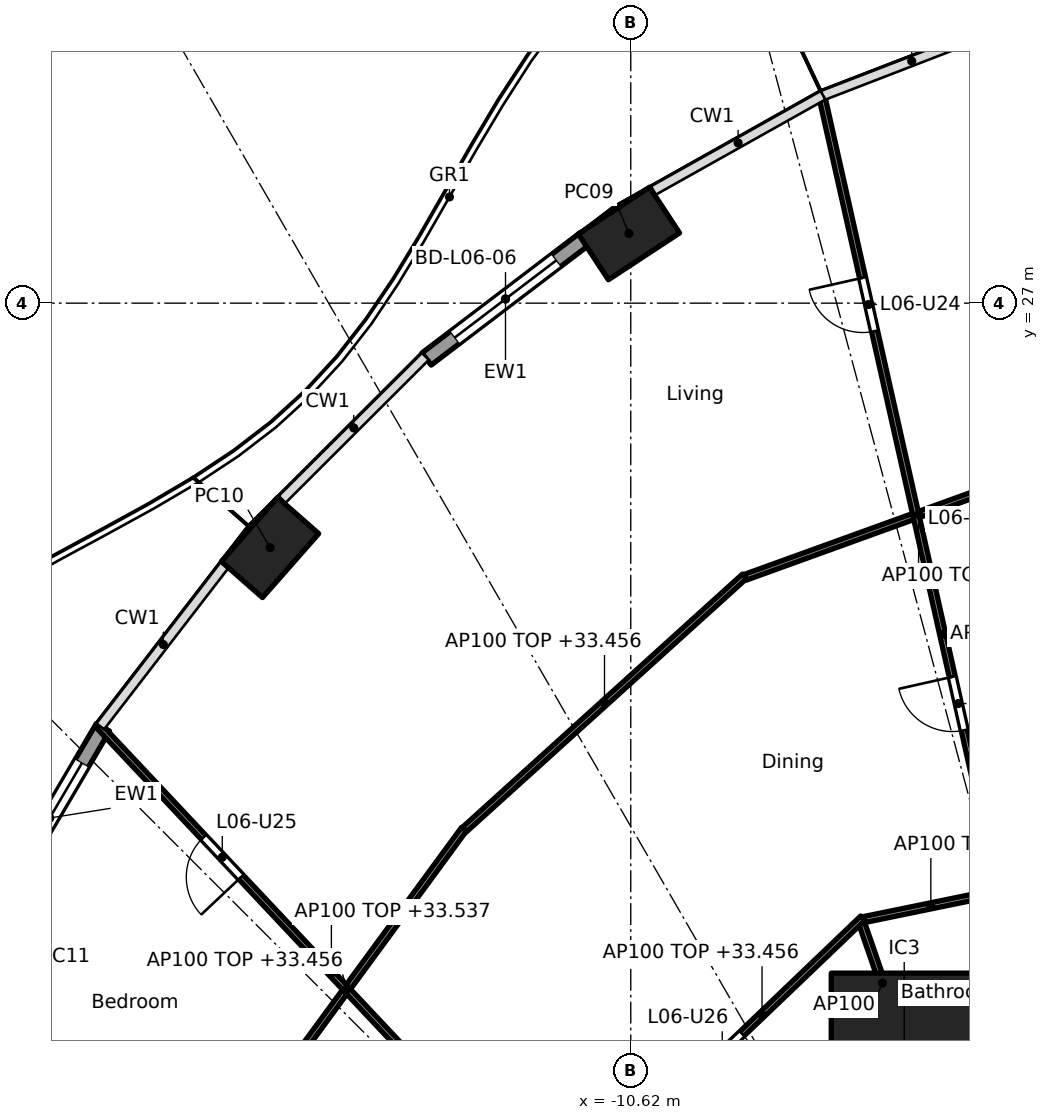
"""IFC4 building model, lengths in metres.
Left out: names, types, materials, properties, quantities, classifications, styles, units other than length and angle.
Written with IfcOpenShell. Run it as: python <this file> out.ifc"""

import sys

from ifc_helpers import new_model, si_unit, direction, frame, frame_2d, origin, origin_2d, place, context, subcontext, project, spatial, rectangle, hollow_rectangle, extrude, element, fill, save


model = new_model("IFC4")
c1 = context("Model", 3, precision=1e-05, world=origin(), true_north=direction((0.0, 1.0)))
c2 = subcontext(c1, "Body", "Model", "MODEL_VIEW")
j1 = project(units=[si_unit("LENGTHUNIT", "METRE"), si_unit("PLANEANGLEUNIT", "RADIAN")], contexts=[c1])
p1 = place(None, origin())
s1 = spatial("IfcSite", under=j1, at=p1, CompositionType="ELEMENT")
p2 = place(p1, origin())
s2 = spatial("IfcBuilding", under=s1, at=p2, CompositionType="ELEMENT")
p3 = place(p2, frame((0.0, 0.0, 30.7)))
s3 = spatial("IfcBuildingStorey", under=s2, at=p3, CompositionType="ELEMENT", Elevation=30.7)
for number, where, z_axis, x_axis in (
    (1, (-10.65, 28.146, 0.0), (0.0, 0.0, 1.0), (-0.836, -0.549, 0.0)),
    (2, (-16.552, 22.981, 0.0), (0.0, 0.0, 1.0), (-0.66, -0.751, 0.0)),
):
    element("IfcColumn", number, at=place(p3, frame(where, z_axis=z_axis, x_axis=x_axis)), inside=s3, PredefinedType="COLUMN", context=c2, shape_type="SweptSolid", body=[
        extrude(hollow_rectangle(XDim=1.4, YDim=0.9, WallThickness=0.05, at=origin_2d()), origin(), (0.0, 0.0, 1.0), 3.7),
    ])
p4 = place(p3, frame((-6.123, 14.782, 0.0), z_axis=(0.0, 0.0, 1.0), x_axis=(1.0, 0.0, 0.0)))
e3 = element("IfcColumn", 3, at=p4, inside=s3, PredefinedType="COLUMN", context=c2, shape_type="SweptSolid", body=[
    extrude(rectangle(XDim=2.4, YDim=2.4, at=origin_2d()), origin(), (0.0, 0.0, 1.0), 3.7),
])
p5 = place(p3, frame((-13.979, 26.081, 0.0), z_axis=(0.0, 0.0, 1.0), x_axis=(0.796022293214, 0.605267303517, 0.0)))
e4 = element("IfcWall", 4, at=p5, inside=s3, PredefinedType="SOLIDWALL", context=c2, shape_type="SweptSolid", body=[
    extrude(rectangle(XDim=3.262, YDim=0.25, at=frame_2d((1.631, 0.0))), origin(), (0.0, 0.0, 1.0), 3.44),
])
p6 = place(p5, frame((0.581, 0.0, 0.0)))
e5 = element("IfcOpeningElement", 5, at=p6, cuts=e4, PredefinedType="OPENING", context=c2, shape_type="SweptSolid", body=[
    extrude(rectangle(XDim=2.1, YDim=2.4, at=frame_2d((1.05, 1.2))), frame((0.0, 0.135, 0.0), z_axis=(0.0, -1.0, 0.0), x_axis=(1.0, 0.0, 0.0)), (0.0, 0.0, 1.0), 0.27),
])
p7 = place(p3, frame((-21.052, 17.04, 0.0), z_axis=(0.0, 0.0, 1.0), x_axis=(0.506311160839, 0.862350861546, 0.0)))
e6 = element("IfcWall", 6, at=p7, inside=s3, PredefinedType="SOLIDWALL", context=c2, shape_type="SweptSolid", body=[
    extrude(rectangle(XDim=3.462, YDim=0.25, at=frame_2d((1.731, 0.0))), origin(), (0.0, 0.0, 1.0), 3.44),
])
p8 = place(p7, frame((0.681, 0.0, 0.0)))
e7 = element("IfcOpeningElement", 7, at=p8, cuts=e6, PredefinedType="OPENING", context=c2, shape_type="SweptSolid", body=[
    extrude(rectangle(XDim=2.1, YDim=2.4, at=frame_2d((1.05, 1.2))), frame((0.0, 0.135, 0.0), z_axis=(0.0, -1.0, 0.0), x_axis=(1.0, 0.0, 0.0)), (0.0, 0.0, 1.0), 0.27),
])
p9 = place(p3, frame((-3.034, 24.554, 0.0), z_axis=(0.0, 0.0, 1.0), x_axis=(-0.940401691072, -0.340065669288, 0.0)))
e8 = element("IfcWall", 8, at=p9, inside=s3, PredefinedType="PARTITIONING", context=c2, shape_type="SweptSolid", body=[
    extrude(rectangle(XDim=6.067, YDim=0.1, at=frame_2d((3.034, 0.0))), origin(), (0.0, 0.0, 1.0), 2.756),
])
p10 = place(p9, frame((1.117, 0.0, 0.0)))
e9 = element("IfcOpeningElement", 9, at=p10, cuts=e8, PredefinedType="OPENING", context=c2, shape_type="SweptSolid", body=[
    extrude(rectangle(XDim=0.9, YDim=2.1, at=frame_2d((0.45, 1.05))), frame((0.0, 0.06, 0.0), z_axis=(0.0, -1.0, 0.0), x_axis=(1.0, 0.0, 0.0)), (0.0, 0.0, 1.0), 0.12),
])
p11 = place(p3, frame((-3.492, 12.662, 0.0), z_axis=(0.0, 0.0, 1.0), x_axis=(-0.219268088006, 0.975664648115, 0.0)))
e10 = element("IfcWall", 10, at=p11, inside=s3, PredefinedType="PARTITIONING", context=c2, shape_type="SweptSolid", body=[
    extrude(rectangle(XDim=18.23, YDim=0.1, at=frame_2d((9.115, 0.0))), origin(), (0.0, 0.0, 1.0), 2.687),
])
p12 = place(p11, frame((0.35, 0.0, 0.0)))
e11 = element("IfcOpeningElement", 11, at=p12, cuts=e10, PredefinedType="OPENING", context=c2, shape_type="SweptSolid", body=[
    extrude(rectangle(XDim=0.9, YDim=2.1, at=frame_2d((0.45, 1.05))), frame((0.0, 0.06, 0.0), z_axis=(0.0, -1.0, 0.0), x_axis=(1.0, 0.0, 0.0)), (0.0, 0.0, 1.0), 0.12),
])
p13 = place(p11, frame((7.497, 0.0, 0.0)))
e12 = element("IfcOpeningElement", 12, at=p13, cuts=e10, PredefinedType="OPENING", context=c2, shape_type="SweptSolid", body=[
    extrude(rectangle(XDim=0.9, YDim=2.1, at=frame_2d((0.45, 1.05))), frame((0.0, 0.06, 0.0), z_axis=(0.0, -1.0, 0.0), x_axis=(1.0, 0.0, 0.0)), (0.0, 0.0, 1.0), 0.12),
])
p14 = place(p11, frame((14.223, 0.0, 0.0)))
e13 = element("IfcOpeningElement", 13, at=p14, cuts=e10, PredefinedType="OPENING", context=c2, shape_type="SweptSolid", body=[
    extrude(rectangle(XDim=0.9, YDim=2.1, at=frame_2d((0.45, 1.05))), frame((0.0, 0.06, 0.0), z_axis=(0.0, -1.0, 0.0), x_axis=(1.0, 0.0, 0.0)), (0.0, 0.0, 1.0), 0.12),
])
p15 = place(p3, frame((-4.58, 17.315, 0.0), z_axis=(0.0, 0.0, 1.0), x_axis=(-0.979581941859, -0.201045316246, 0.0)))
e14 = element("IfcWall", 14, at=p15, inside=s3, PredefinedType="PARTITIONING", context=c2, shape_type="SweptSolid", body=[
    extrude(rectangle(XDim=2.256, YDim=0.1, at=frame_2d((1.128, 0.0))), origin(), (0.0, 0.0, 1.0), 2.756),
])
p16 = place(p3, frame((-6.139, 14.83, 0.0), z_axis=(0.0, 0.0, 1.0), x_axis=(-0.327246993321, 0.944938836837, 0.0)))
e15 = element("IfcWall", 15, at=p16, inside=s3, PredefinedType="PARTITIONING", context=c2, shape_type="SweptSolid", body=[
    extrude(rectangle(XDim=2.09, YDim=0.1, at=frame_2d((1.045, 0.0))), origin(), (0.0, 0.0, 1.0), 3.44),
])
p17 = place(p3, frame((-6.803, 16.886, 0.0), z_axis=(0.0, 0.0, 1.0), x_axis=(-0.722763212502, -0.69109575216, 0.0)))
e16 = element("IfcWall", 16, at=p17, inside=s3, PredefinedType="PARTITIONING", context=c2, shape_type="SweptSolid", body=[
    extrude(rectangle(XDim=4.587, YDim=0.1, at=frame_2d((2.293, 0.0))), origin(), (0.0, 0.0, 1.0), 2.756),
])
p18 = place(p17, frame((2.75, 0.0, 0.0)))
e17 = element("IfcOpeningElement", 17, at=p18, cuts=e16, PredefinedType="OPENING", context=c2, shape_type="SweptSolid", body=[
    extrude(rectangle(XDim=0.9, YDim=2.1, at=frame_2d((0.45, 1.05))), frame((0.0, 0.06, 0.0), z_axis=(0.0, -1.0, 0.0), x_axis=(1.0, 0.0, 0.0)), (0.0, 0.0, 1.0), 0.12),
])
p19 = place(p3, frame((-8.749, 22.508, 0.0), z_axis=(0.0, 0.0, 1.0), x_axis=(-0.741720189244, -0.670709445936, 0.0)))
e18 = element("IfcWall", 18, at=p19, inside=s3, PredefinedType="PARTITIONING", context=c2, shape_type="SweptSolid", body=[
    extrude(rectangle(XDim=6.209, YDim=0.1, at=frame_2d((3.104, 0.0))), origin(), (0.0, 0.0, 1.0), 2.756),
])
p20 = place(p3, frame((-13.362, 18.35, 0.0), z_axis=(0.0, 0.0, 1.0), x_axis=(-0.591191311491, -0.806531359104, 0.0)))
e19 = element("IfcWall", 19, at=p20, inside=s3, PredefinedType="PARTITIONING", context=c2, shape_type="SweptSolid", body=[
    extrude(rectangle(XDim=6.51, YDim=0.1, at=frame_2d((3.255, 0.0))), origin(), (0.0, 0.0, 1.0), 2.756),
])
p21 = place(p3, frame((-11.707, 11.9, 0.0), z_axis=(0.0, 0.0, 1.0), x_axis=(-0.685030806147, 0.728514100501, 0.0)))
e20 = element("IfcWall", 20, at=p21, inside=s3, PredefinedType="PARTITIONING", context=c2, shape_type="SweptSolid", body=[
    extrude(rectangle(XDim=11.201, YDim=0.1, at=frame_2d((5.601, 0.0))), origin(), (0.0, 0.0, 1.0), 2.837),
])
p22 = place(p21, frame((2.169, 0.0, 0.0)))
e21 = element("IfcOpeningElement", 21, at=p22, cuts=e20, PredefinedType="OPENING", context=c2, shape_type="SweptSolid", body=[
    extrude(rectangle(XDim=0.9, YDim=2.1, at=frame_2d((0.45, 1.05))), frame((0.0, 0.06, 0.0), z_axis=(0.0, -1.0, 0.0), x_axis=(1.0, 0.0, 0.0)), (0.0, 0.0, 1.0), 0.12),
])
p23 = place(p21, frame((7.77, 0.0, 0.0)))
e22 = element("IfcOpeningElement", 22, at=p23, cuts=e20, PredefinedType="OPENING", context=c2, shape_type="SweptSolid", body=[
    extrude(rectangle(XDim=0.9, YDim=2.1, at=frame_2d((0.45, 1.05))), frame((0.0, 0.06, 0.0), z_axis=(0.0, -1.0, 0.0), x_axis=(1.0, 0.0, 0.0)), (0.0, 0.0, 1.0), 0.12),
])
p24 = place(p6, origin())
e23 = element("IfcDoor", 23, at=p24, inside=s3, OperationType="SLIDING_TO_LEFT", PredefinedType="DOOR", context=c2, shape_type="SweptSolid", body=[
    extrude(rectangle(XDim=2.1, YDim=2.4, at=frame_2d((1.05, 1.2))), frame((0.0, 0.025, 0.0), z_axis=(0.0, -1.0, 0.0), x_axis=(1.0, 0.0, 0.0)), (0.0, 0.0, 1.0), 0.05),
])
fill(e5, e23)
p25 = place(p8, origin())
e24 = element("IfcDoor", 24, at=p25, inside=s3, OperationType="SLIDING_TO_LEFT", PredefinedType="DOOR", context=c2, shape_type="SweptSolid", body=[
    extrude(rectangle(XDim=2.1, YDim=2.4, at=frame_2d((1.05, 1.2))), frame((0.0, 0.025, 0.0), z_axis=(0.0, -1.0, 0.0), x_axis=(1.0, 0.0, 0.0)), (0.0, 0.0, 1.0), 0.05),
])
fill(e7, e24)
p26 = place(p13, origin())
e25 = element("IfcDoor", 25, at=p26, inside=s3, OperationType="SINGLE_SWING_RIGHT", PredefinedType="DOOR", context=c2, shape_type="SweptSolid", body=[
    extrude(rectangle(XDim=0.9, YDim=2.1, at=frame_2d((0.45, 1.05))), frame((0.0, 0.025, 0.0), z_axis=(0.0, -1.0, 0.0), x_axis=(1.0, 0.0, 0.0)), (0.0, 0.0, 1.0), 0.05),
])
fill(e12, e25)
p27 = place(p14, origin())
e26 = element("IfcDoor", 26, at=p27, inside=s3, OperationType="SINGLE_SWING_RIGHT", PredefinedType="DOOR", context=c2, shape_type="SweptSolid", body=[
    extrude(rectangle(XDim=0.9, YDim=2.1, at=frame_2d((0.45, 1.05))), frame((0.0, 0.025, 0.0), z_axis=(0.0, -1.0, 0.0), x_axis=(1.0, 0.0, 0.0)), (0.0, 0.0, 1.0), 0.05),
])
fill(e13, e26)
p28 = place(p23, origin())
e27 = element("IfcDoor", 27, at=p28, inside=s3, OperationType="SINGLE_SWING_LEFT", PredefinedType="DOOR", context=c2, shape_type="SweptSolid", body=[
    extrude(rectangle(XDim=0.9, YDim=2.1, at=frame_2d((0.45, 1.05))), frame((0.0, 0.025, 0.0), z_axis=(0.0, -1.0, 0.0), x_axis=(1.0, 0.0, 0.0)), (0.0, 0.0, 1.0), 0.05),
])
fill(e22, e27)
p29 = place(p18, origin())
e28 = element("IfcDoor", 28, at=p29, inside=s3, OperationType="SINGLE_SWING_RIGHT", PredefinedType="DOOR", context=c2, shape_type="SweptSolid", body=[
    extrude(rectangle(XDim=0.9, YDim=2.1, at=frame_2d((0.45, 1.05))), frame((0.0, 0.025, 0.0), z_axis=(0.0, -1.0, 0.0), x_axis=(1.0, 0.0, 0.0)), (0.0, 0.0, 1.0), 0.05),
])
fill(e17, e28)
save(model, sys.argv[1])
